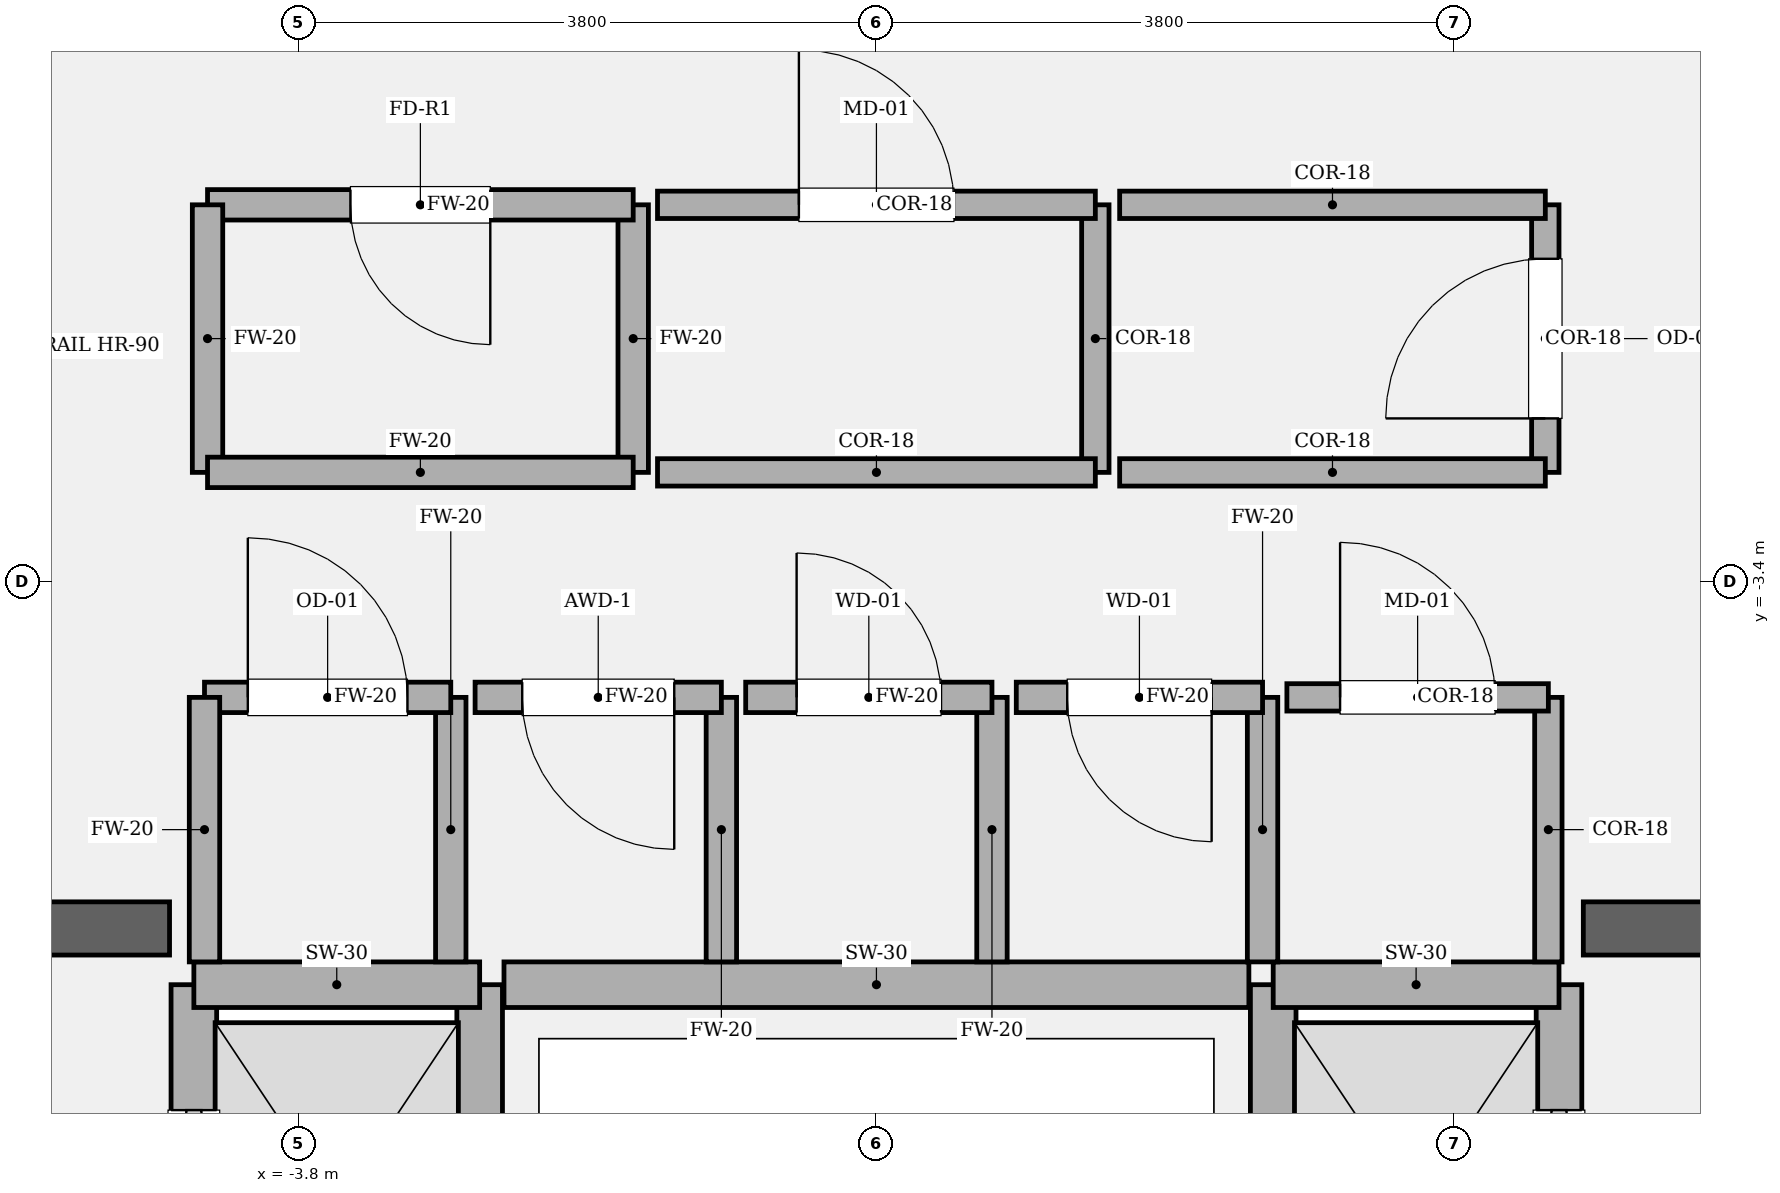
"""IFC4 building model, lengths in metres.
Left out: names, types, materials, properties, quantities, classifications, styles, units other than length and angle.
Written with IfcOpenShell. Run it as: python <this file> out.ifc"""

import sys

from ifc_helpers import new_model, si_unit, direction, frame, frame_2d, origin, place, context, subcontext, project, spatial, rectangle, extrude, element, fill, save


model = new_model("IFC4")
c1 = context("Model", 3, precision=1e-05, world=origin(), true_north=direction((0.0, 1.0)))
c2 = subcontext(c1, "Body", "Model", "MODEL_VIEW")
j1 = project(units=[si_unit("LENGTHUNIT", "METRE"), si_unit("PLANEANGLEUNIT", "RADIAN")], contexts=[c1])
p1 = place(None, origin())
s1 = spatial("IfcSite", under=j1, at=p1, CompositionType="ELEMENT")
p2 = place(p1, origin())
s2 = spatial("IfcBuilding", under=s1, at=p2, CompositionType="ELEMENT")
p3 = place(p2, frame((0.0, 0.0, 196.5)))
s3 = spatial("IfcBuildingStorey", under=s2, at=p3, CompositionType="ELEMENT", Elevation=196.5)
p4 = place(p3, frame((-9.875, -5.68, 0.0), z_axis=(0.0, 0.0, 1.0), x_axis=(1.0, 0.0, 0.0)))
e1 = element("IfcWall", 1, at=p4, inside=s3, PredefinedType="SOLIDWALL", context=c2, shape_type="SweptSolid", body=[
    extrude(rectangle(XDim=5.225, YDim=0.35, at=frame_2d((2.613, 0.0))), origin(), (0.0, 0.0, 1.0), 4.05),
])
p5 = place(p4, frame((1.335, 0.0, 0.0)))
e2 = element("IfcOpeningElement", 2, at=p5, cuts=e1, PredefinedType="OPENING", context=c2, shape_type="SweptSolid", body=[
    extrude(rectangle(XDim=1.18, YDim=2.2, at=frame_2d((0.59, 1.1))), frame((0.0, 0.185, 0.0), z_axis=(0.0, -1.0, 0.0), x_axis=(1.0, 0.0, 0.0)), (0.0, 0.0, 1.0), 0.37),
])
p6 = place(p3, frame((4.65, -5.68, 0.0), z_axis=(0.0, 0.0, 1.0), x_axis=(1.0, 0.0, 0.0)))
e3 = element("IfcWall", 3, at=p6, inside=s3, PredefinedType="SOLIDWALL", context=c2, shape_type="SweptSolid", body=[
    extrude(rectangle(XDim=5.225, YDim=0.35, at=frame_2d((2.613, 0.0))), origin(), (0.0, 0.0, 1.0), 4.05),
])
p7 = place(p6, frame((2.71, 0.0, 0.0)))
e4 = element("IfcOpeningElement", 4, at=p7, cuts=e3, PredefinedType="OPENING", context=c2, shape_type="SweptSolid", body=[
    extrude(rectangle(XDim=1.18, YDim=2.2, at=frame_2d((0.59, 1.1))), frame((0.0, 0.185, 0.0), z_axis=(0.0, -1.0, 0.0), x_axis=(1.0, 0.0, 0.0)), (0.0, 0.0, 1.0), 0.37),
])
p8 = place(p3, frame((-4.49, -8.82, 0.0), z_axis=(0.0, 0.0, 1.0), x_axis=(0.0, 1.0, 0.0)))
e5 = element("IfcWall", 5, at=p8, inside=s3, PredefinedType="SOLIDWALL", context=c2, shape_type="SweptSolid", body=[
    extrude(rectangle(XDim=2.77, YDim=0.3, at=frame_2d((1.385, 0.0))), origin(), (0.0, 0.0, 1.0), 3.83),
])
p9 = place(p8, frame((0.825, 0.0, 0.0)))
e6 = element("IfcOpeningElement", 6, at=p9, cuts=e5, PredefinedType="OPENING", context=c2, shape_type="SweptSolid", body=[
    extrude(rectangle(XDim=1.12, YDim=2.25, at=frame_2d((0.56, 1.125))), frame((0.0, 0.16, 0.0), z_axis=(0.0, -1.0, 0.0), x_axis=(1.0, 0.0, 0.0)), (0.0, 0.0, 1.0), 0.32),
])
p10 = place(p3, frame((-2.61, -8.82, 0.0), z_axis=(0.0, 0.0, 1.0), x_axis=(0.0, 1.0, 0.0)))
e7 = element("IfcWall", 7, at=p10, inside=s3, PredefinedType="SOLIDWALL", context=c2, shape_type="SweptSolid", body=[
    extrude(rectangle(XDim=2.77, YDim=0.3, at=frame_2d((1.385, 0.0))), origin(), (0.0, 0.0, 1.0), 3.83),
])
p11 = place(p3, frame((-4.49, -6.05, 0.0), z_axis=(0.0, 0.0, 1.0), x_axis=(1.0, 0.0, 0.0)))
e8 = element("IfcWall", 8, at=p11, inside=s3, PredefinedType="SOLIDWALL", context=c2, shape_type="SweptSolid", body=[
    extrude(rectangle(XDim=1.88, YDim=0.3, at=frame_2d((0.94, 0.0))), origin(), (0.0, 0.0, 1.0), 3.83),
])
p12 = place(p3, frame((4.49, -8.82, 0.0), z_axis=(0.0, 0.0, 1.0), x_axis=(0.0, 1.0, 0.0)))
e9 = element("IfcWall", 9, at=p12, inside=s3, PredefinedType="SOLIDWALL", context=c2, shape_type="SweptSolid", body=[
    extrude(rectangle(XDim=2.77, YDim=0.3, at=frame_2d((1.385, 0.0))), origin(), (0.0, 0.0, 1.0), 3.83),
])
p13 = place(p12, frame((0.825, 0.0, 0.0)))
e10 = element("IfcOpeningElement", 10, at=p13, cuts=e9, PredefinedType="OPENING", context=c2, shape_type="SweptSolid", body=[
    extrude(rectangle(XDim=1.12, YDim=2.25, at=frame_2d((0.56, 1.125))), frame((0.0, 0.16, 0.0), z_axis=(0.0, -1.0, 0.0), x_axis=(1.0, 0.0, 0.0)), (0.0, 0.0, 1.0), 0.32),
])
p14 = place(p3, frame((2.61, -8.82, 0.0), z_axis=(0.0, 0.0, 1.0), x_axis=(0.0, 1.0, 0.0)))
e11 = element("IfcWall", 11, at=p14, inside=s3, PredefinedType="SOLIDWALL", context=c2, shape_type="SweptSolid", body=[
    extrude(rectangle(XDim=2.77, YDim=0.3, at=frame_2d((1.385, 0.0))), origin(), (0.0, 0.0, 1.0), 3.83),
])
p15 = place(p3, frame((2.61, -6.05, 0.0), z_axis=(0.0, 0.0, 1.0), x_axis=(1.0, 0.0, 0.0)))
e12 = element("IfcWall", 12, at=p15, inside=s3, PredefinedType="SOLIDWALL", context=c2, shape_type="SweptSolid", body=[
    extrude(rectangle(XDim=1.88, YDim=0.3, at=frame_2d((0.94, 0.0))), origin(), (0.0, 0.0, 1.0), 3.83),
])
p16 = place(p3, frame((-2.45, -6.05, 0.0), z_axis=(0.0, 0.0, 1.0), x_axis=(1.0, 0.0, 0.0)))
e13 = element("IfcWall", 13, at=p16, inside=s3, PredefinedType="SOLIDWALL", context=c2, shape_type="SweptSolid", body=[
    extrude(rectangle(XDim=4.9, YDim=0.3, at=frame_2d((2.45, 0.0))), origin(), (0.0, 0.0, 1.0), 3.83),
])
p17 = place(p3, frame((-2.8, -5.9, 0.0), z_axis=(0.0, 0.0, 1.0), x_axis=(0.0, 1.0, 0.0)))
e14 = element("IfcWall", 14, at=p17, inside=s3, PredefinedType="SOLIDWALL", context=c2, shape_type="SweptSolid", body=[
    extrude(rectangle(XDim=1.74, YDim=0.2, at=frame_2d((0.87, 0.0))), origin(), (0.0, 0.0, 1.0), 3.83),
])
p18 = place(p3, frame((-2.8, -4.16, 0.0), z_axis=(0.0, 0.0, 1.0), x_axis=(-1.0, 0.0, 0.0)))
e15 = element("IfcWall", 15, at=p18, inside=s3, PredefinedType="SOLIDWALL", context=c2, shape_type="SweptSolid", body=[
    extrude(rectangle(XDim=1.62, YDim=0.2, at=frame_2d((0.81, 0.0))), origin(), (0.0, 0.0, 1.0), 3.83),
])
p19 = place(p18, frame((0.285, 0.0, 0.0)))
e16 = element("IfcOpeningElement", 16, at=p19, cuts=e15, PredefinedType="OPENING", context=c2, shape_type="SweptSolid", body=[
    extrude(rectangle(XDim=1.05, YDim=2.2, at=frame_2d((0.525, 1.1))), frame((0.0, 0.11, 0.0), z_axis=(0.0, -1.0, 0.0), x_axis=(1.0, 0.0, 0.0)), (0.0, 0.0, 1.0), 0.22),
])
for number, where, z_axis, x_axis in (
    (17, (-4.42, -4.16, 0.0), (0.0, 0.0, 1.0), (0.0, -1.0, 0.0)),
    (18, (-1.02, -5.9, 0.0), (0.0, 0.0, 1.0), (0.0, 1.0, 0.0)),
):
    element("IfcWall", number, at=place(p3, frame(where, z_axis=z_axis, x_axis=x_axis)), inside=s3, PredefinedType="SOLIDWALL", context=c2, shape_type="SweptSolid", body=[
        extrude(rectangle(XDim=1.74, YDim=0.2, at=frame_2d((0.87, 0.0))), origin(), (0.0, 0.0, 1.0), 3.83),
    ])
p20 = place(p3, frame((-1.02, -4.16, 0.0), z_axis=(0.0, 0.0, 1.0), x_axis=(-1.0, 0.0, 0.0)))
e19 = element("IfcWall", 19, at=p20, inside=s3, PredefinedType="SOLIDWALL", context=c2, shape_type="SweptSolid", body=[
    extrude(rectangle(XDim=1.62, YDim=0.2, at=frame_2d((0.81, 0.0))), origin(), (0.0, 0.0, 1.0), 3.83),
])
p21 = place(p20, frame((0.31, 0.0, 0.0)))
e20 = element("IfcOpeningElement", 20, at=p21, cuts=e19, PredefinedType="OPENING", context=c2, shape_type="SweptSolid", body=[
    extrude(rectangle(XDim=1.0, YDim=2.15, at=frame_2d((0.5, 1.075))), frame((0.0, 0.11, 0.0), z_axis=(0.0, -1.0, 0.0), x_axis=(1.0, 0.0, 0.0)), (0.0, 0.0, 1.0), 0.22),
])
p22 = place(p3, frame((0.76, -5.9, 0.0), z_axis=(0.0, 0.0, 1.0), x_axis=(0.0, 1.0, 0.0)))
e21 = element("IfcWall", 21, at=p22, inside=s3, PredefinedType="SOLIDWALL", context=c2, shape_type="SweptSolid", body=[
    extrude(rectangle(XDim=1.74, YDim=0.2, at=frame_2d((0.87, 0.0))), origin(), (0.0, 0.0, 1.0), 3.83),
])
p23 = place(p3, frame((0.76, -4.16, 0.0), z_axis=(0.0, 0.0, 1.0), x_axis=(-1.0, 0.0, 0.0)))
e22 = element("IfcWall", 22, at=p23, inside=s3, PredefinedType="SOLIDWALL", context=c2, shape_type="SweptSolid", body=[
    extrude(rectangle(XDim=1.62, YDim=0.2, at=frame_2d((0.81, 0.0))), origin(), (0.0, 0.0, 1.0), 3.83),
])
p24 = place(p23, frame((0.335, 0.0, 0.0)))
e23 = element("IfcOpeningElement", 23, at=p24, cuts=e22, PredefinedType="OPENING", context=c2, shape_type="SweptSolid", body=[
    extrude(rectangle(XDim=0.95, YDim=2.15, at=frame_2d((0.475, 1.075))), frame((0.0, 0.11, 0.0), z_axis=(0.0, -1.0, 0.0), x_axis=(1.0, 0.0, 0.0)), (0.0, 0.0, 1.0), 0.22),
])
p25 = place(p3, frame((2.54, -5.9, 0.0), z_axis=(0.0, 0.0, 1.0), x_axis=(0.0, 1.0, 0.0)))
e24 = element("IfcWall", 24, at=p25, inside=s3, PredefinedType="SOLIDWALL", context=c2, shape_type="SweptSolid", body=[
    extrude(rectangle(XDim=1.74, YDim=0.2, at=frame_2d((0.87, 0.0))), origin(), (0.0, 0.0, 1.0), 3.83),
])
p26 = place(p3, frame((2.54, -4.16, 0.0), z_axis=(0.0, 0.0, 1.0), x_axis=(-1.0, 0.0, 0.0)))
e25 = element("IfcWall", 25, at=p26, inside=s3, PredefinedType="SOLIDWALL", context=c2, shape_type="SweptSolid", body=[
    extrude(rectangle(XDim=1.62, YDim=0.2, at=frame_2d((0.81, 0.0))), origin(), (0.0, 0.0, 1.0), 3.83),
])
p27 = place(p26, frame((0.335, 0.0, 0.0)))
e26 = element("IfcOpeningElement", 26, at=p27, cuts=e25, PredefinedType="OPENING", context=c2, shape_type="SweptSolid", body=[
    extrude(rectangle(XDim=0.95, YDim=2.15, at=frame_2d((0.475, 1.075))), frame((0.0, 0.11, 0.0), z_axis=(0.0, -1.0, 0.0), x_axis=(1.0, 0.0, 0.0)), (0.0, 0.0, 1.0), 0.22),
])
p28 = place(p3, frame((4.42, -5.9, 0.0), z_axis=(0.0, 0.0, 1.0), x_axis=(0.0, 1.0, 0.0)))
e27 = element("IfcWall", 27, at=p28, inside=s3, PredefinedType="PARTITIONING", context=c2, shape_type="SweptSolid", body=[
    extrude(rectangle(XDim=1.74, YDim=0.18, at=frame_2d((0.87, 0.0))), origin(), (0.0, 0.0, 1.0), 3.83),
])
p29 = place(p3, frame((4.42, -4.16, 0.0), z_axis=(0.0, 0.0, 1.0), x_axis=(-1.0, 0.0, 0.0)))
e28 = element("IfcWall", 28, at=p29, inside=s3, PredefinedType="PARTITIONING", context=c2, shape_type="SweptSolid", body=[
    extrude(rectangle(XDim=1.72, YDim=0.18, at=frame_2d((0.86, 0.0))), origin(), (0.0, 0.0, 1.0), 3.83),
])
p30 = place(p29, frame((0.35, 0.0, 0.0)))
e29 = element("IfcOpeningElement", 29, at=p30, cuts=e28, PredefinedType="OPENING", context=c2, shape_type="SweptSolid", body=[
    extrude(rectangle(XDim=1.02, YDim=2.2, at=frame_2d((0.51, 1.1))), frame((0.0, 0.1, 0.0), z_axis=(0.0, -1.0, 0.0), x_axis=(1.0, 0.0, 0.0)), (0.0, 0.0, 1.0), 0.2),
])
p31 = place(p3, frame((-1.6, -2.68, 0.0), z_axis=(0.0, 0.0, 1.0), x_axis=(0.0, 1.0, 0.0)))
e30 = element("IfcWall", 30, at=p31, inside=s3, PredefinedType="SOLIDWALL", context=c2, shape_type="SweptSolid", body=[
    extrude(rectangle(XDim=1.76, YDim=0.2, at=frame_2d((0.88, 0.0))), origin(), (0.0, 0.0, 1.0), 3.83),
])
p32 = place(p3, frame((-1.6, -0.92, 0.0), z_axis=(0.0, 0.0, 1.0), x_axis=(-1.0, 0.0, 0.0)))
e31 = element("IfcWall", 31, at=p32, inside=s3, PredefinedType="SOLIDWALL", context=c2, shape_type="SweptSolid", body=[
    extrude(rectangle(XDim=2.8, YDim=0.2, at=frame_2d((1.4, 0.0))), origin(), (0.0, 0.0, 1.0), 3.83),
])
p33 = place(p32, frame((0.94, 0.0, 0.0)))
e32 = element("IfcOpeningElement", 32, at=p33, cuts=e31, PredefinedType="OPENING", context=c2, shape_type="SweptSolid", body=[
    extrude(rectangle(XDim=0.92, YDim=2.1, at=frame_2d((0.46, 1.05))), frame((0.0, 0.11, 0.0), z_axis=(0.0, -1.0, 0.0), x_axis=(1.0, 0.0, 0.0)), (0.0, 0.0, 1.0), 0.22),
])
p34 = place(p3, frame((-4.4, -0.92, 0.0), z_axis=(0.0, 0.0, 1.0), x_axis=(0.0, -1.0, 0.0)))
e33 = element("IfcWall", 33, at=p34, inside=s3, PredefinedType="SOLIDWALL", context=c2, shape_type="SweptSolid", body=[
    extrude(rectangle(XDim=1.76, YDim=0.2, at=frame_2d((0.88, 0.0))), origin(), (0.0, 0.0, 1.0), 3.83),
])
p35 = place(p3, frame((-4.4, -2.68, 0.0), z_axis=(0.0, 0.0, 1.0), x_axis=(1.0, 0.0, 0.0)))
e34 = element("IfcWall", 34, at=p35, inside=s3, PredefinedType="SOLIDWALL", context=c2, shape_type="SweptSolid", body=[
    extrude(rectangle(XDim=2.8, YDim=0.2, at=frame_2d((1.4, 0.0))), origin(), (0.0, 0.0, 1.0), 3.83),
])
p36 = place(p3, frame((1.44, -2.68, 0.0), z_axis=(0.0, 0.0, 1.0), x_axis=(0.0, 1.0, 0.0)))
e35 = element("IfcWall", 35, at=p36, inside=s3, PredefinedType="PARTITIONING", context=c2, shape_type="SweptSolid", body=[
    extrude(rectangle(XDim=1.76, YDim=0.18, at=frame_2d((0.88, 0.0))), origin(), (0.0, 0.0, 1.0), 3.83),
])
p37 = place(p3, frame((1.44, -0.92, 0.0), z_axis=(0.0, 0.0, 1.0), x_axis=(-1.0, 0.0, 0.0)))
e36 = element("IfcWall", 36, at=p37, inside=s3, PredefinedType="PARTITIONING", context=c2, shape_type="SweptSolid", body=[
    extrude(rectangle(XDim=2.88, YDim=0.18, at=frame_2d((1.44, 0.0))), origin(), (0.0, 0.0, 1.0), 3.83),
])
p38 = place(p37, frame((0.93, 0.0, 0.0)))
e37 = element("IfcOpeningElement", 37, at=p38, cuts=e36, PredefinedType="OPENING", context=c2, shape_type="SweptSolid", body=[
    extrude(rectangle(XDim=1.02, YDim=2.2, at=frame_2d((0.51, 1.1))), frame((0.0, 0.1, 0.0), z_axis=(0.0, -1.0, 0.0), x_axis=(1.0, 0.0, 0.0)), (0.0, 0.0, 1.0), 0.2),
])
p39 = place(p3, frame((-1.44, -2.68, 0.0), z_axis=(0.0, 0.0, 1.0), x_axis=(1.0, 0.0, 0.0)))
e38 = element("IfcWall", 38, at=p39, inside=s3, PredefinedType="PARTITIONING", context=c2, shape_type="SweptSolid", body=[
    extrude(rectangle(XDim=2.88, YDim=0.18, at=frame_2d((1.44, 0.0))), origin(), (0.0, 0.0, 1.0), 3.83),
])
p40 = place(p3, frame((4.4, -2.68, 0.0), z_axis=(0.0, 0.0, 1.0), x_axis=(0.0, 1.0, 0.0)))
e39 = element("IfcWall", 39, at=p40, inside=s3, PredefinedType="PARTITIONING", context=c2, shape_type="SweptSolid", body=[
    extrude(rectangle(XDim=1.76, YDim=0.18, at=frame_2d((0.88, 0.0))), origin(), (0.0, 0.0, 1.0), 3.83),
])
p41 = place(p40, frame((0.355, 0.0, 0.0)))
e40 = element("IfcOpeningElement", 40, at=p41, cuts=e39, PredefinedType="OPENING", context=c2, shape_type="SweptSolid", body=[
    extrude(rectangle(XDim=1.05, YDim=2.2, at=frame_2d((0.525, 1.1))), frame((0.0, 0.1, 0.0), z_axis=(0.0, -1.0, 0.0), x_axis=(1.0, 0.0, 0.0)), (0.0, 0.0, 1.0), 0.2),
])
for number, where, z_axis, x_axis in (
    (41, (4.4, -0.92, 0.0), (0.0, 0.0, 1.0), (-1.0, 0.0, 0.0)),
    (42, (1.6, -2.68, 0.0), (0.0, 0.0, 1.0), (1.0, 0.0, 0.0)),
):
    element("IfcWall", number, at=place(p3, frame(where, z_axis=z_axis, x_axis=x_axis)), inside=s3, PredefinedType="PARTITIONING", context=c2, shape_type="SweptSolid", body=[
        extrude(rectangle(XDim=2.8, YDim=0.18, at=frame_2d((1.4, 0.0))), origin(), (0.0, 0.0, 1.0), 3.83),
    ])
p42 = place(p9, origin())
e43 = element("IfcDoor", 43, at=p42, inside=s3, OperationType="SLIDING_TO_LEFT", PredefinedType="DOOR", context=c2, shape_type="SweptSolid", body=[
    extrude(rectangle(XDim=1.12, YDim=2.25, at=frame_2d((0.56, 1.125))), frame((0.0, 0.025, 0.0), z_axis=(0.0, -1.0, 0.0), x_axis=(1.0, 0.0, 0.0)), (0.0, 0.0, 1.0), 0.05),
])
fill(e6, e43)
p43 = place(p13, origin())
e44 = element("IfcDoor", 44, at=p43, inside=s3, OperationType="SLIDING_TO_RIGHT", PredefinedType="DOOR", context=c2, shape_type="SweptSolid", body=[
    extrude(rectangle(XDim=1.12, YDim=2.25, at=frame_2d((0.56, 1.125))), frame((0.0, 0.025, 0.0), z_axis=(0.0, -1.0, 0.0), x_axis=(1.0, 0.0, 0.0)), (0.0, 0.0, 1.0), 0.05),
])
fill(e10, e44)
p44 = place(p19, origin())
e45 = element("IfcDoor", 45, at=p44, inside=s3, OperationType="SINGLE_SWING_RIGHT", PredefinedType="DOOR", context=c2, shape_type="SweptSolid", body=[
    extrude(rectangle(XDim=1.05, YDim=2.2, at=frame_2d((0.525, 1.1))), frame((0.0, 0.025, 0.0), z_axis=(0.0, -1.0, 0.0), x_axis=(1.0, 0.0, 0.0)), (0.0, 0.0, 1.0), 0.05),
])
fill(e16, e45)
p45 = place(p21, origin())
e46 = element("IfcDoor", 46, at=p45, inside=s3, OperationType="SINGLE_SWING_LEFT", PredefinedType="DOOR", context=c2, shape_type="SweptSolid", body=[
    extrude(rectangle(XDim=1.0, YDim=2.15, at=frame_2d((0.5, 1.075))), frame((0.0, 0.025, 0.0), z_axis=(0.0, -1.0, 0.0), x_axis=(1.0, 0.0, 0.0)), (0.0, 0.0, 1.0), 0.05),
])
fill(e20, e46)
p46 = place(p24, origin())
e47 = element("IfcDoor", 47, at=p46, inside=s3, OperationType="SINGLE_SWING_RIGHT", PredefinedType="DOOR", context=c2, shape_type="SweptSolid", body=[
    extrude(rectangle(XDim=0.95, YDim=2.15, at=frame_2d((0.475, 1.075))), frame((0.0, 0.025, 0.0), z_axis=(0.0, -1.0, 0.0), x_axis=(1.0, 0.0, 0.0)), (0.0, 0.0, 1.0), 0.05),
])
fill(e23, e47)
p47 = place(p27, origin())
e48 = element("IfcDoor", 48, at=p47, inside=s3, OperationType="SINGLE_SWING_LEFT", PredefinedType="DOOR", context=c2, shape_type="SweptSolid", body=[
    extrude(rectangle(XDim=0.95, YDim=2.15, at=frame_2d((0.475, 1.075))), frame((0.0, 0.025, 0.0), z_axis=(0.0, -1.0, 0.0), x_axis=(1.0, 0.0, 0.0)), (0.0, 0.0, 1.0), 0.05),
])
fill(e26, e48)
p48 = place(p30, origin())
e49 = element("IfcDoor", 49, at=p48, inside=s3, OperationType="SINGLE_SWING_RIGHT", PredefinedType="DOOR", context=c2, shape_type="SweptSolid", body=[
    extrude(rectangle(XDim=1.02, YDim=2.2, at=frame_2d((0.51, 1.1))), frame((0.0, 0.025, 0.0), z_axis=(0.0, -1.0, 0.0), x_axis=(1.0, 0.0, 0.0)), (0.0, 0.0, 1.0), 0.05),
])
fill(e29, e49)
p49 = place(p33, origin())
e50 = element("IfcDoor", 50, at=p49, inside=s3, OperationType="SINGLE_SWING_LEFT", PredefinedType="DOOR", context=c2, shape_type="SweptSolid", body=[
    extrude(rectangle(XDim=0.92, YDim=2.1, at=frame_2d((0.46, 1.05))), frame((0.0, 0.025, 0.0), z_axis=(0.0, -1.0, 0.0), x_axis=(1.0, 0.0, 0.0)), (0.0, 0.0, 1.0), 0.05),
])
fill(e32, e50)
p50 = place(p38, origin())
e51 = element("IfcDoor", 51, at=p50, inside=s3, OperationType="SINGLE_SWING_RIGHT", PredefinedType="DOOR", context=c2, shape_type="SweptSolid", body=[
    extrude(rectangle(XDim=1.02, YDim=2.2, at=frame_2d((0.51, 1.1))), frame((0.0, 0.025, 0.0), z_axis=(0.0, -1.0, 0.0), x_axis=(1.0, 0.0, 0.0)), (0.0, 0.0, 1.0), 0.05),
])
fill(e37, e51)
p51 = place(p41, origin())
e52 = element("IfcDoor", 52, at=p51, inside=s3, OperationType="SINGLE_SWING_LEFT", PredefinedType="DOOR", context=c2, shape_type="SweptSolid", body=[
    extrude(rectangle(XDim=1.05, YDim=2.2, at=frame_2d((0.525, 1.1))), frame((0.0, 0.025, 0.0), z_axis=(0.0, -1.0, 0.0), x_axis=(1.0, 0.0, 0.0)), (0.0, 0.0, 1.0), 0.05),
])
fill(e40, e52)
save(model, sys.argv[1])
